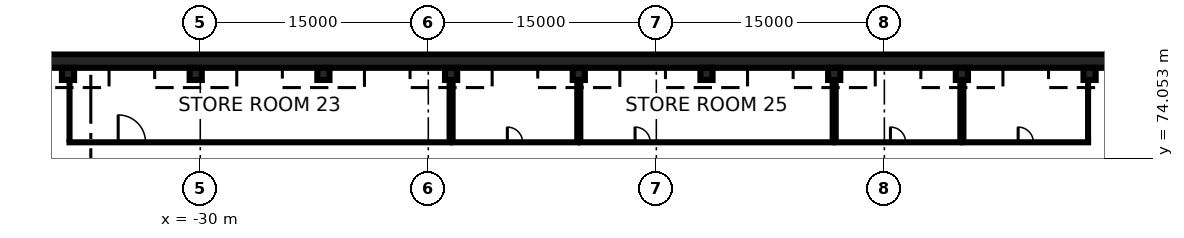
"""IFC4 building model, lengths in metres.
Left out: names, types, materials, properties, quantities, classifications, styles, units other than length and angle.
Written with IfcOpenShell. Run it as: python <this file> out.ifc"""

import sys

from ifc_helpers import new_model, si_unit, direction, frame, frame_2d, origin, origin_2d, place, context, subcontext, project, spatial, rectangle, extrude, element, fill, save


model = new_model("IFC4")
c1 = context("Model", 3, precision=1e-05, world=origin(), true_north=direction((0.0, 1.0)))
c2 = subcontext(c1, "Body", "Model", "MODEL_VIEW")
j1 = project(units=[si_unit("LENGTHUNIT", "METRE"), si_unit("PLANEANGLEUNIT", "RADIAN")], contexts=[c1])
p1 = place(None, origin())
s1 = spatial("IfcSite", under=j1, at=p1, CompositionType="ELEMENT")
p2 = place(p1, origin())
s2 = spatial("IfcBuilding", under=s1, at=p2, CompositionType="ELEMENT")
p3 = place(p2, frame((0.0, 0.0, -12.0)))
s3 = spatial("IfcBuildingStorey", under=s2, at=p3, CompositionType="ELEMENT", Elevation=-12.0)
p4 = place(p3, frame((-123.6, 80.45, 0.0), z_axis=(0.0, 0.0, 1.0), x_axis=(1.0, 0.0, 0.0)))
e1 = element("IfcWall", 1, at=p4, inside=s3, PredefinedType="USERDEFINED", context=c2, shape_type="SweptSolid", body=[
    extrude(rectangle(XDim=169.8, YDim=0.9, at=frame_2d((84.9, 0.0))), origin(), (0.0, 0.0, 1.0), 11.55),
])
for number, where, z_axis, x_axis in (
    (2, (-38.7, 79.6, 0.0), (0.0, 0.0, 1.0), (1.0, 0.0, 0.0)),
    (3, (-30.3, 79.6, 0.0), (0.0, 0.0, 1.0), (1.0, 0.0, 0.0)),
    (4, (-21.9, 79.6, 0.0), (0.0, 0.0, 1.0), (1.0, 0.0, 0.0)),
    (5, (-13.5, 79.6, 0.0), (0.0, 0.0, 1.0), (1.0, 0.0, 0.0)),
    (6, (-5.1, 79.6, 0.0), (0.0, 0.0, 1.0), (1.0, 0.0, 0.0)),
    (7, (3.3, 79.6, 0.0), (0.0, 0.0, 1.0), (1.0, 0.0, 0.0)),
    (8, (11.7, 79.6, 0.0), (0.0, 0.0, 1.0), (1.0, 0.0, 0.0)),
    (9, (20.1, 79.6, 0.0), (0.0, 0.0, 1.0), (1.0, 0.0, 0.0)),
    (10, (28.5, 79.6, 0.0), (0.0, 0.0, 1.0), (1.0, 0.0, 0.0)),
):
    element("IfcColumn", number, at=place(p3, frame(where, z_axis=z_axis, x_axis=x_axis)), inside=s3, PredefinedType="COLUMN", context=c2, shape_type="SweptSolid", body=[
        extrude(rectangle(XDim=0.8, YDim=0.8, at=origin_2d()), origin(), (0.0, 0.0, 1.0), 4.4),
    ])
p5 = place(p3, frame((-38.7, 75.1, 0.0), z_axis=(0.0, 0.0, 1.0), x_axis=(1.0, 0.0, 0.0)))
e11 = element("IfcWall", 11, at=p5, inside=s3, PredefinedType="PARTITIONING", context=c2, shape_type="SweptSolid", body=[
    extrude(rectangle(XDim=25.2, YDim=0.2, at=frame_2d((12.6, 0.0))), origin(), (0.0, 0.0, 1.0), 4.4),
])
p6 = place(p5, frame((3.3, 0.0, 0.0)))
e12 = element("IfcOpeningElement", 12, at=p6, cuts=e11, PredefinedType="OPENING", context=c2, shape_type="SweptSolid", body=[
    extrude(rectangle(XDim=1.8, YDim=2.1, at=frame_2d((0.9, 1.05))), frame((0.0, 0.11, 0.0), z_axis=(0.0, -1.0, 0.0), x_axis=(1.0, 0.0, 0.0)), (0.0, 0.0, 1.0), 0.22),
])
for number, where, z_axis, x_axis in (
    (13, (-38.6, 75.2, 0.0), (0.0, 0.0, 1.0), (0.0, 1.0, 0.0)),
    (14, (-13.6, 75.2, 0.0), (0.0, 0.0, 1.0), (0.0, 1.0, 0.0)),
):
    element("IfcWall", number, at=place(p3, frame(where, z_axis=z_axis, x_axis=x_axis)), inside=s3, PredefinedType="PARTITIONING", context=c2, shape_type="SweptSolid", body=[
        extrude(rectangle(XDim=4.0, YDim=0.2, at=frame_2d((2.0, 0.0))), origin(), (0.0, 0.0, 1.0), 4.4),
    ])
p7 = place(p3, frame((-13.5, 75.1, 0.0), z_axis=(0.0, 0.0, 1.0), x_axis=(1.0, 0.0, 0.0)))
e15 = element("IfcWall", 15, at=p7, inside=s3, PredefinedType="PARTITIONING", context=c2, shape_type="SweptSolid", body=[
    extrude(rectangle(XDim=8.4, YDim=0.2, at=frame_2d((4.2, 0.0))), origin(), (0.0, 0.0, 1.0), 4.4),
])
p8 = place(p7, frame((3.7, 0.0, 0.0)))
e16 = element("IfcOpeningElement", 16, at=p8, cuts=e15, PredefinedType="OPENING", context=c2, shape_type="SweptSolid", body=[
    extrude(rectangle(XDim=1.0, YDim=2.1, at=frame_2d((0.5, 1.05))), frame((0.0, 0.11, 0.0), z_axis=(0.0, -1.0, 0.0), x_axis=(1.0, 0.0, 0.0)), (0.0, 0.0, 1.0), 0.22),
])
for number, where, z_axis, x_axis in (
    (17, (-13.4, 75.2, 0.0), (0.0, 0.0, 1.0), (0.0, 1.0, 0.0)),
    (18, (-5.2, 75.2, 0.0), (0.0, 0.0, 1.0), (0.0, 1.0, 0.0)),
):
    element("IfcWall", number, at=place(p3, frame(where, z_axis=z_axis, x_axis=x_axis)), inside=s3, PredefinedType="PARTITIONING", context=c2, shape_type="SweptSolid", body=[
        extrude(rectangle(XDim=4.0, YDim=0.2, at=frame_2d((2.0, 0.0))), origin(), (0.0, 0.0, 1.0), 4.4),
    ])
p9 = place(p3, frame((-5.1, 75.1, 0.0), z_axis=(0.0, 0.0, 1.0), x_axis=(1.0, 0.0, 0.0)))
e19 = element("IfcWall", 19, at=p9, inside=s3, PredefinedType="PARTITIONING", context=c2, shape_type="SweptSolid", body=[
    extrude(rectangle(XDim=16.8, YDim=0.2, at=frame_2d((8.4, 0.0))), origin(), (0.0, 0.0, 1.0), 4.4),
])
p10 = place(p9, frame((3.7, 0.0, 0.0)))
e20 = element("IfcOpeningElement", 20, at=p10, cuts=e19, PredefinedType="OPENING", context=c2, shape_type="SweptSolid", body=[
    extrude(rectangle(XDim=1.0, YDim=2.1, at=frame_2d((0.5, 1.05))), frame((0.0, 0.11, 0.0), z_axis=(0.0, -1.0, 0.0), x_axis=(1.0, 0.0, 0.0)), (0.0, 0.0, 1.0), 0.22),
])
for number, where, z_axis, x_axis in (
    (21, (-5.0, 75.2, 0.0), (0.0, 0.0, 1.0), (0.0, 1.0, 0.0)),
    (22, (11.6, 75.2, 0.0), (0.0, 0.0, 1.0), (0.0, 1.0, 0.0)),
):
    element("IfcWall", number, at=place(p3, frame(where, z_axis=z_axis, x_axis=x_axis)), inside=s3, PredefinedType="PARTITIONING", context=c2, shape_type="SweptSolid", body=[
        extrude(rectangle(XDim=4.0, YDim=0.2, at=frame_2d((2.0, 0.0))), origin(), (0.0, 0.0, 1.0), 4.4),
    ])
p11 = place(p3, frame((11.7, 75.1, 0.0), z_axis=(0.0, 0.0, 1.0), x_axis=(1.0, 0.0, 0.0)))
e23 = element("IfcWall", 23, at=p11, inside=s3, PredefinedType="PARTITIONING", context=c2, shape_type="SweptSolid", body=[
    extrude(rectangle(XDim=8.4, YDim=0.2, at=frame_2d((4.2, 0.0))), origin(), (0.0, 0.0, 1.0), 4.4),
])
p12 = place(p11, frame((3.7, 0.0, 0.0)))
e24 = element("IfcOpeningElement", 24, at=p12, cuts=e23, PredefinedType="OPENING", context=c2, shape_type="SweptSolid", body=[
    extrude(rectangle(XDim=1.0, YDim=2.1, at=frame_2d((0.5, 1.05))), frame((0.0, 0.11, 0.0), z_axis=(0.0, -1.0, 0.0), x_axis=(1.0, 0.0, 0.0)), (0.0, 0.0, 1.0), 0.22),
])
for number, where, z_axis, x_axis in (
    (25, (11.8, 75.2, 0.0), (0.0, 0.0, 1.0), (0.0, 1.0, 0.0)),
    (26, (20.0, 75.2, 0.0), (0.0, 0.0, 1.0), (0.0, 1.0, 0.0)),
):
    element("IfcWall", number, at=place(p3, frame(where, z_axis=z_axis, x_axis=x_axis)), inside=s3, PredefinedType="PARTITIONING", context=c2, shape_type="SweptSolid", body=[
        extrude(rectangle(XDim=4.0, YDim=0.2, at=frame_2d((2.0, 0.0))), origin(), (0.0, 0.0, 1.0), 4.4),
    ])
p13 = place(p3, frame((20.1, 75.1, 0.0), z_axis=(0.0, 0.0, 1.0), x_axis=(1.0, 0.0, 0.0)))
e27 = element("IfcWall", 27, at=p13, inside=s3, PredefinedType="PARTITIONING", context=c2, shape_type="SweptSolid", body=[
    extrude(rectangle(XDim=8.4, YDim=0.2, at=frame_2d((4.2, 0.0))), origin(), (0.0, 0.0, 1.0), 4.4),
])
p14 = place(p13, frame((3.7, 0.0, 0.0)))
e28 = element("IfcOpeningElement", 28, at=p14, cuts=e27, PredefinedType="OPENING", context=c2, shape_type="SweptSolid", body=[
    extrude(rectangle(XDim=1.0, YDim=2.1, at=frame_2d((0.5, 1.05))), frame((0.0, 0.11, 0.0), z_axis=(0.0, -1.0, 0.0), x_axis=(1.0, 0.0, 0.0)), (0.0, 0.0, 1.0), 0.22),
])
for number, where, z_axis, x_axis in (
    (29, (20.2, 75.2, 0.0), (0.0, 0.0, 1.0), (0.0, 1.0, 0.0)),
    (30, (28.4, 75.2, 0.0), (0.0, 0.0, 1.0), (0.0, 1.0, 0.0)),
):
    element("IfcWall", number, at=place(p3, frame(where, z_axis=z_axis, x_axis=x_axis)), inside=s3, PredefinedType="PARTITIONING", context=c2, shape_type="SweptSolid", body=[
        extrude(rectangle(XDim=4.0, YDim=0.2, at=frame_2d((2.0, 0.0))), origin(), (0.0, 0.0, 1.0), 4.4),
    ])
p15 = place(p6, origin())
e31 = element("IfcDoor", 31, at=p15, inside=s3, OperationType="DOUBLE_DOOR_SINGLE_SWING", PredefinedType="DOOR", context=c2, shape_type="SweptSolid", body=[
    extrude(rectangle(XDim=1.8, YDim=2.1, at=frame_2d((0.9, 1.05))), frame((0.0, 0.025, 0.0), z_axis=(0.0, -1.0, 0.0), x_axis=(1.0, 0.0, 0.0)), (0.0, 0.0, 1.0), 0.05),
])
fill(e12, e31)
p16 = place(p8, origin())
e32 = element("IfcDoor", 32, at=p16, inside=s3, OperationType="SINGLE_SWING_LEFT", PredefinedType="DOOR", context=c2, shape_type="SweptSolid", body=[
    extrude(rectangle(XDim=1.0, YDim=2.1, at=frame_2d((0.5, 1.05))), frame((0.0, 0.025, 0.0), z_axis=(0.0, -1.0, 0.0), x_axis=(1.0, 0.0, 0.0)), (0.0, 0.0, 1.0), 0.05),
])
fill(e16, e32)
p17 = place(p10, origin())
e33 = element("IfcDoor", 33, at=p17, inside=s3, OperationType="SINGLE_SWING_LEFT", PredefinedType="DOOR", context=c2, shape_type="SweptSolid", body=[
    extrude(rectangle(XDim=1.0, YDim=2.1, at=frame_2d((0.5, 1.05))), frame((0.0, 0.025, 0.0), z_axis=(0.0, -1.0, 0.0), x_axis=(1.0, 0.0, 0.0)), (0.0, 0.0, 1.0), 0.05),
])
fill(e20, e33)
p18 = place(p12, origin())
e34 = element("IfcDoor", 34, at=p18, inside=s3, OperationType="SINGLE_SWING_LEFT", PredefinedType="DOOR", context=c2, shape_type="SweptSolid", body=[
    extrude(rectangle(XDim=1.0, YDim=2.1, at=frame_2d((0.5, 1.05))), frame((0.0, 0.025, 0.0), z_axis=(0.0, -1.0, 0.0), x_axis=(1.0, 0.0, 0.0)), (0.0, 0.0, 1.0), 0.05),
])
fill(e24, e34)
p19 = place(p14, origin())
e35 = element("IfcDoor", 35, at=p19, inside=s3, OperationType="SINGLE_SWING_LEFT", PredefinedType="DOOR", context=c2, shape_type="SweptSolid", body=[
    extrude(rectangle(XDim=1.0, YDim=2.1, at=frame_2d((0.5, 1.05))), frame((0.0, 0.025, 0.0), z_axis=(0.0, -1.0, 0.0), x_axis=(1.0, 0.0, 0.0)), (0.0, 0.0, 1.0), 0.05),
])
fill(e28, e35)
save(model, sys.argv[1])
